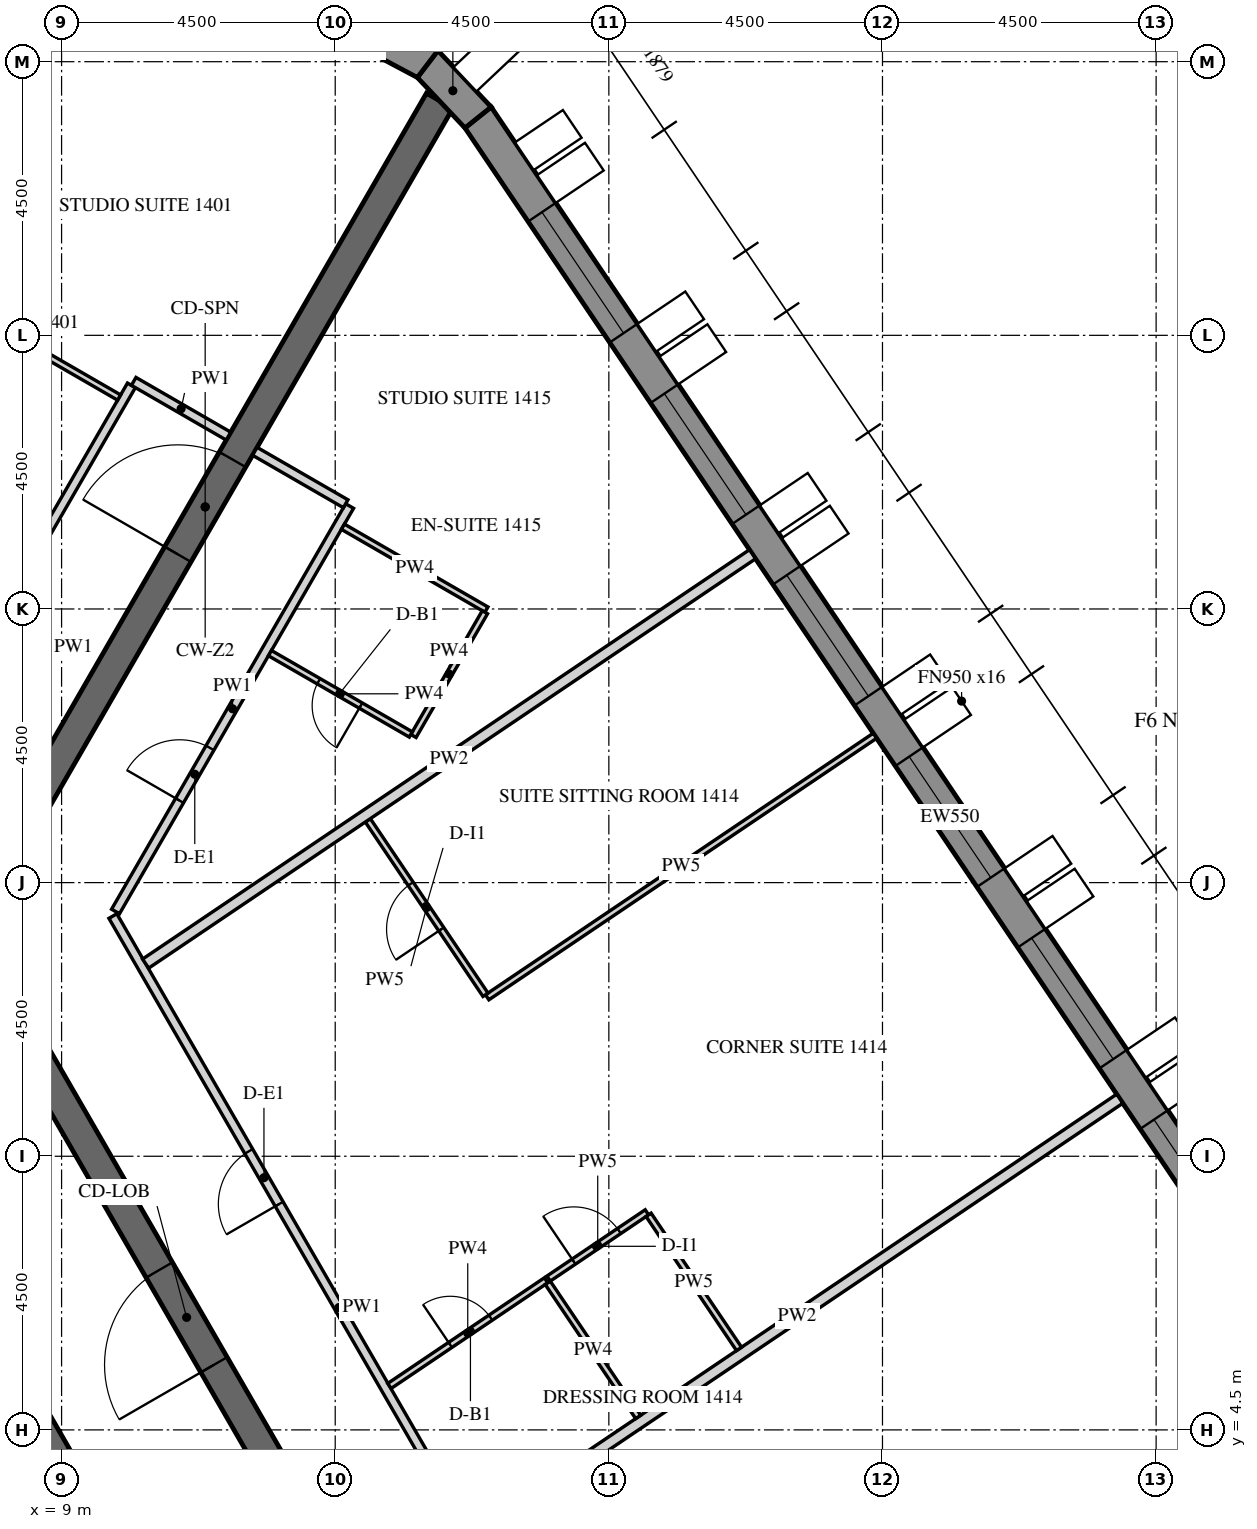
"""IFC4 building model, lengths in metres.
Left out: names, types, materials, properties, quantities, classifications, styles, units other than length and angle.
Written with IfcOpenShell. Run it as: python <this file> out.ifc"""

import sys

from ifc_helpers import new_model, si_unit, direction, frame, frame_2d, origin, place, context, subcontext, project, spatial, polyline, rectangle, outline, extrude, element, fill, save


model = new_model("IFC4")
c1 = context("Model", 3, precision=1e-05, world=origin(), true_north=direction((0.0, 1.0)))
c2 = subcontext(c1, "Body", "Model", "MODEL_VIEW")
j1 = project(units=[si_unit("LENGTHUNIT", "METRE"), si_unit("PLANEANGLEUNIT", "RADIAN")], contexts=[c1])
p1 = place(None, origin())
s1 = spatial("IfcSite", under=j1, at=p1, CompositionType="ELEMENT")
p2 = place(p1, origin())
s2 = spatial("IfcBuilding", under=s1, at=p2, CompositionType="ELEMENT")
p3 = place(p2, frame((0.0, 0.0, 183.9)))
s3 = spatial("IfcBuildingStorey", under=s2, at=p3, CompositionType="ELEMENT", Elevation=183.9)
p4 = place(p3, frame((31.371, 3.071, -0.15), z_axis=(0.0, 0.0, 1.0), x_axis=(-0.559189891278, 0.829039604297, 0.0)))
e1 = element("IfcWall", 1, at=p4, inside=s3, PredefinedType="SOLIDWALL", context=c2, shape_type="SweptSolid", body=[
    extrude(outline(polyline([(-0.026, -0.275), (27.781, -0.275), (27.736, 0.275), (0.026, 0.275), (-0.026, -0.275)])), origin(), (0.0, 0.0, 1.0), 3.9),
])
p5 = place(p4, frame((1.879, 0.0, 1.05)))
e2 = element("IfcOpeningElement", 2, at=p5, cuts=e1, PredefinedType="OPENING", context=c2, shape_type="SweptSolid", body=[
    extrude(rectangle(XDim=2.4, YDim=2.4, at=frame_2d((1.2, 1.2))), frame((0.0, 0.285, 0.0), z_axis=(0.0, -1.0, 0.0), x_axis=(1.0, 0.0, 0.0)), (0.0, 0.0, 1.0), 0.57),
])
p6 = place(p4, frame((5.479, 0.0, 1.05)))
e3 = element("IfcOpeningElement", 3, at=p6, cuts=e1, PredefinedType="OPENING", context=c2, shape_type="SweptSolid", body=[
    extrude(rectangle(XDim=2.4, YDim=2.4, at=frame_2d((1.2, 1.2))), frame((0.0, 0.285, 0.0), z_axis=(0.0, -1.0, 0.0), x_axis=(1.0, 0.0, 0.0)), (0.0, 0.0, 1.0), 0.57),
])
p7 = place(p4, frame((9.079, 0.0, 1.05)))
e4 = element("IfcOpeningElement", 4, at=p7, cuts=e1, PredefinedType="OPENING", context=c2, shape_type="SweptSolid", body=[
    extrude(rectangle(XDim=2.4, YDim=2.4, at=frame_2d((1.2, 1.2))), frame((0.0, 0.285, 0.0), z_axis=(0.0, -1.0, 0.0), x_axis=(1.0, 0.0, 0.0)), (0.0, 0.0, 1.0), 0.57),
])
p8 = place(p4, frame((12.679, 0.0, 1.05)))
e5 = element("IfcOpeningElement", 5, at=p8, cuts=e1, PredefinedType="OPENING", context=c2, shape_type="SweptSolid", body=[
    extrude(rectangle(XDim=2.4, YDim=2.4, at=frame_2d((1.2, 1.2))), frame((0.0, 0.285, 0.0), z_axis=(0.0, -1.0, 0.0), x_axis=(1.0, 0.0, 0.0)), (0.0, 0.0, 1.0), 0.57),
])
p9 = place(p4, frame((16.279, 0.0, 1.05)))
e6 = element("IfcOpeningElement", 6, at=p9, cuts=e1, PredefinedType="OPENING", context=c2, shape_type="SweptSolid", body=[
    extrude(rectangle(XDim=2.4, YDim=2.4, at=frame_2d((1.2, 1.2))), frame((0.0, 0.285, 0.0), z_axis=(0.0, -1.0, 0.0), x_axis=(1.0, 0.0, 0.0)), (0.0, 0.0, 1.0), 0.57),
])
p10 = place(p4, frame((19.879, 0.0, 1.05)))
e7 = element("IfcOpeningElement", 7, at=p10, cuts=e1, PredefinedType="OPENING", context=c2, shape_type="SweptSolid", body=[
    extrude(rectangle(XDim=2.4, YDim=2.4, at=frame_2d((1.2, 1.2))), frame((0.0, 0.285, 0.0), z_axis=(0.0, -1.0, 0.0), x_axis=(1.0, 0.0, 0.0)), (0.0, 0.0, 1.0), 0.57),
])
p11 = place(p4, frame((23.479, 0.0, 1.05)))
e8 = element("IfcOpeningElement", 8, at=p11, cuts=e1, PredefinedType="OPENING", context=c2, shape_type="SweptSolid", body=[
    extrude(rectangle(XDim=2.4, YDim=2.4, at=frame_2d((1.2, 1.2))), frame((0.0, 0.285, 0.0), z_axis=(0.0, -1.0, 0.0), x_axis=(1.0, 0.0, 0.0)), (0.0, 0.0, 1.0), 0.57),
])
p12 = place(p3, frame((15.849, 26.083, -0.15), z_axis=(0.0, 0.0, 1.0), x_axis=(-0.686196220404, 0.727416488061, 0.0)))
e9 = element("IfcWall", 9, at=p12, inside=s3, PredefinedType="SOLIDWALL", context=c2, shape_type="SweptSolid", body=[
    extrude(outline(polyline([(-0.022, -0.275), (1.253, -0.275), (1.163, 0.275), (0.022, 0.275), (-0.022, -0.275)])), origin(), (0.0, 0.0, 1.0), 3.9),
])
p13 = place(p3, frame((15.02, 26.962, -0.15), z_axis=(0.0, 0.0, 1.0), x_axis=(-0.882950818639, 0.469465495926, 0.0)))
e10 = element("IfcWall", 10, at=p13, inside=s3, PredefinedType="SOLIDWALL", context=c2, shape_type="SweptSolid", body=[
    extrude(outline(polyline([(-0.045, -0.275), (1.253, -0.275), (1.163, 0.275), (0.045, 0.275), (-0.045, -0.275)])), origin(), (0.0, 0.0, 1.0), 3.9),
])
p14 = place(p3, frame((14.722, 0.0, -0.15), z_axis=(0.0, 0.0, 1.0), x_axis=(-0.50000571537, 0.866022103989, 0.0)))
e11 = element("IfcWall", 11, at=p14, inside=s3, PredefinedType="SHEAR", context=c2, shape_type="SweptSolid", body=[
    extrude(outline(polyline([(-0.144, -0.25), (14.867, -0.25), (14.578, 0.25), (0.144, 0.25), (-0.144, -0.25)])), origin(), (0.0, 0.0, 1.0), 3.9),
])
p15 = place(p14, frame((6.432, 0.0, 0.15)))
e12 = element("IfcOpeningElement", 12, at=p15, cuts=e11, PredefinedType="OPENING", context=c2, shape_type="SweptSolid", body=[
    extrude(rectangle(XDim=1.8, YDim=2.4, at=frame_2d((0.9, 1.2))), frame((0.0, 0.26, 0.0), z_axis=(0.0, -1.0, 0.0), x_axis=(1.0, 0.0, 0.0)), (0.0, 0.0, 1.0), 0.52),
])
p16 = place(p3, frame((7.506, 13.0, -0.15), z_axis=(0.0, 0.0, 1.0), x_axis=(0.499988271576, 0.866032175087, 0.0)))
e13 = element("IfcWall", 13, at=p16, inside=s3, PredefinedType="SHEAR", context=c2, shape_type="SweptSolid", body=[
    extrude(rectangle(XDim=15.424, YDim=0.5, at=frame_2d((7.712, 0.0))), origin(), (0.0, 0.0, 1.0), 3.9),
])
p17 = place(p16, frame((6.812, 0.0, 0.15)))
e14 = element("IfcOpeningElement", 14, at=p17, cuts=e13, PredefinedType="OPENING", context=c2, shape_type="SweptSolid", body=[
    extrude(rectangle(XDim=1.8, YDim=2.4, at=frame_2d((0.9, 1.2))), frame((0.0, 0.26, 0.0), z_axis=(0.0, -1.0, 0.0), x_axis=(1.0, 0.0, 0.0)), (0.0, 0.0, 1.0), 0.52),
])
p18 = place(p3, frame((11.345, 0.0, -0.15), z_axis=(0.0, 0.0, 1.0), x_axis=(-0.499995046907, 0.866028263435, 0.0)))
e15 = element("IfcWall", 15, at=p18, inside=s3, PredefinedType="SHEAR", context=c2, shape_type="SweptSolid", body=[
    extrude(outline(polyline([(-0.101, -0.175), (11.446, -0.175), (11.244, 0.175), (0.101, 0.175), (-0.101, -0.175)])), origin(), (0.0, 0.0, 1.0), 3.9),
])
p19 = place(p18, frame((4.744, 0.0, 0.15)))
e16 = element("IfcOpeningElement", 16, at=p19, cuts=e15, PredefinedType="OPENING", context=c2, shape_type="SweptSolid", body=[
    extrude(rectangle(XDim=1.8, YDim=2.4, at=frame_2d((0.9, 1.2))), frame((0.0, 0.185, 0.0), z_axis=(0.0, -1.0, 0.0), x_axis=(1.0, 0.0, 0.0)), (0.0, 0.0, 1.0), 0.37),
])
p20 = place(p3, frame((10.149, 21.678, 0.0), z_axis=(0.0, 0.0, 1.0), x_axis=(-0.499993780622, -0.866028994514, 0.0)))
e17 = element("IfcWall", 17, at=p20, inside=s3, PredefinedType="PARTITIONING", context=c2, shape_type="SweptSolid", body=[
    extrude(rectangle(XDim=7.711, YDim=0.15, at=frame_2d((3.855, 0.0))), origin(), (0.0, 0.0, 1.0), 2.988),
])
p21 = place(p20, frame((4.718, 0.0, 0.0)))
e18 = element("IfcOpeningElement", 18, at=p21, cuts=e17, PredefinedType="OPENING", context=c2, shape_type="SweptSolid", body=[
    extrude(rectangle(XDim=1.0, YDim=2.1, at=frame_2d((0.5, 1.05))), frame((0.0, 0.085, 0.0), z_axis=(0.0, -1.0, 0.0), x_axis=(1.0, 0.0, 0.0)), (0.0, 0.0, 1.0), 0.17),
])
p22 = place(p3, frame((11.745, 20.843, 0.0), z_axis=(0.0, 0.0, 1.0), x_axis=(-0.865989075817, 0.500062916607, 0.0)))
e19 = element("IfcWall", 19, at=p22, inside=s3, PredefinedType="PARTITIONING", context=c2, shape_type="SweptSolid", body=[
    extrude(rectangle(XDim=1.8, YDim=0.15, at=frame_2d((0.9, 0.0))), origin(), (0.0, 0.0, 1.0), 2.988),
])
p23 = place(p3, frame((17.277, 0.075, 0.0), z_axis=(0.0, 0.0, 1.0), x_axis=(-0.499998228944, 0.866026426302, 0.0)))
e20 = element("IfcWall", 20, at=p23, inside=s3, PredefinedType="PARTITIONING", context=c2, shape_type="SweptSolid", body=[
    extrude(rectangle(XDim=14.867, YDim=0.15, at=frame_2d((7.433, 0.0))), origin(), (0.0, 0.0, 1.0), 2.988),
])
p24 = place(p23, frame((9.398, 0.0, 0.0)))
e21 = element("IfcOpeningElement", 21, at=p24, cuts=e20, PredefinedType="OPENING", context=c2, shape_type="SweptSolid", body=[
    extrude(rectangle(XDim=1.0, YDim=2.1, at=frame_2d((0.5, 1.05))), frame((0.0, 0.085, 0.0), z_axis=(0.0, -1.0, 0.0), x_axis=(1.0, 0.0, 0.0)), (0.0, 0.0, 1.0), 0.17),
])
p25 = place(p3, frame((9.887, 13.025, 0.0), z_axis=(0.0, 0.0, 1.0), x_axis=(0.499985955615, 0.866033512162, 0.0)))
e22 = element("IfcWall", 22, at=p25, inside=s3, PredefinedType="PARTITIONING", context=c2, shape_type="SweptSolid", body=[
    extrude(rectangle(XDim=7.699, YDim=0.15, at=frame_2d((3.85, 0.0))), origin(), (0.0, 0.0, 1.0), 2.988),
])
p26 = place(p25, frame((2.106, 0.0, 0.0)))
e23 = element("IfcOpeningElement", 23, at=p26, cuts=e22, PredefinedType="OPENING", context=c2, shape_type="SweptSolid", body=[
    extrude(rectangle(XDim=1.0, YDim=2.1, at=frame_2d((0.5, 1.05))), frame((0.0, 0.085, 0.0), z_axis=(0.0, -1.0, 0.0), x_axis=(1.0, 0.0, 0.0)), (0.0, 0.0, 1.0), 0.17),
])
p27 = place(p3, frame((13.672, 19.73, 0.0), z_axis=(0.0, 0.0, 1.0), x_axis=(-0.866074815912, 0.499914405916, 0.0)))
e24 = element("IfcWall", 24, at=p27, inside=s3, PredefinedType="PARTITIONING", context=c2, shape_type="SweptSolid", body=[
    extrude(rectangle(XDim=1.725, YDim=0.15, at=frame_2d((0.862, 0.0))), origin(), (0.0, 0.0, 1.0), 2.988),
])
p28 = place(p3, frame((7.803, 22.715, 0.0), z_axis=(0.0, 0.0, 1.0), x_axis=(0.866006523861, -0.500032699561, 0.0)))
e25 = element("IfcWall", 25, at=p28, inside=s3, PredefinedType="PARTITIONING", context=c2, shape_type="SweptSolid", body=[
    extrude(rectangle(XDim=2.475, YDim=0.1, at=frame_2d((1.237, 0.0))), origin(), (0.0, 0.0, 1.0), 2.988),
])
p29 = place(p3, frame((26.402, 9.946, 0.0), z_axis=(0.0, 0.0, 1.0), x_axis=(-0.829037771727, -0.559192608187, 0.0)))
e26 = element("IfcWall", 26, at=p29, inside=s3, PredefinedType="PARTITIONING", context=c2, shape_type="SweptSolid", body=[
    extrude(rectangle(XDim=12.794, YDim=0.18, at=frame_2d((6.397, 0.0))), origin(), (0.0, 0.0, 1.0), 2.988),
])
p30 = place(p3, frame((14.392, 5.223, 0.0), z_axis=(0.0, 0.0, 1.0), x_axis=(0.829015360708, 0.559225832477, 0.0)))
e27 = element("IfcWall", 27, at=p30, inside=s3, PredefinedType="PARTITIONING", context=c2, shape_type="SweptSolid", body=[
    extrude(rectangle(XDim=3.107, YDim=0.1, at=frame_2d((1.553, 0.0))), origin(), (0.0, 0.0, 1.0), 2.988),
])
p31 = place(p30, frame((1.207, 0.0, 0.0)))
e28 = element("IfcOpeningElement", 28, at=p31, cuts=e27, PredefinedType="OPENING", context=c2, shape_type="SweptSolid", body=[
    extrude(rectangle(XDim=0.8, YDim=2.1, at=frame_2d((0.4, 1.05))), frame((0.0, 0.06, 0.0), z_axis=(0.0, -1.0, 0.0), x_axis=(1.0, 0.0, 0.0)), (0.0, 0.0, 1.0), 0.12),
])
p32 = place(p3, frame((17.009, 6.988, 0.0), z_axis=(0.0, 0.0, 1.0), x_axis=(0.828974932022, 0.559285760662, 0.0)))
e29 = element("IfcWall", 29, at=p32, inside=s3, PredefinedType="PARTITIONING", context=c2, shape_type="SweptSolid", body=[
    extrude(rectangle(XDim=1.95, YDim=0.1, at=frame_2d((0.975, 0.0))), origin(), (0.0, 0.0, 1.0), 2.988),
])
p33 = place(p32, frame((0.5, 0.0, 0.0)))
e30 = element("IfcOpeningElement", 30, at=p33, cuts=e29, PredefinedType="OPENING", context=c2, shape_type="SweptSolid", body=[
    extrude(rectangle(XDim=0.9, YDim=2.1, at=frame_2d((0.45, 1.05))), frame((0.0, 0.06, 0.0), z_axis=(0.0, -1.0, 0.0), x_axis=(1.0, 0.0, 0.0)), (0.0, 0.0, 1.0), 0.12),
])
p34 = place(p3, frame((18.653, 8.037, 0.0), z_axis=(0.0, 0.0, 1.0), x_axis=(0.559203284223, -0.829030570555, 0.0)))
e31 = element("IfcWall", 31, at=p34, inside=s3, PredefinedType="PARTITIONING", context=c2, shape_type="SweptSolid", body=[
    extrude(rectangle(XDim=2.66, YDim=0.1, at=frame_2d((1.33, 0.0))), origin(), (0.0, 0.0, 1.0), 2.988),
])
p35 = place(p3, frame((22.376, 15.915, 0.0), z_axis=(0.0, 0.0, 1.0), x_axis=(-0.829044752643, -0.559182258406, 0.0)))
e32 = element("IfcWall", 32, at=p35, inside=s3, PredefinedType="PARTITIONING", context=c2, shape_type="SweptSolid", body=[
    extrude(rectangle(XDim=7.692, YDim=0.1, at=frame_2d((3.846, 0.0))), origin(), (0.0, 0.0, 1.0), 2.988),
])
p36 = place(p3, frame((15.971, 11.656, 0.0), z_axis=(0.0, 0.0, 1.0), x_axis=(-0.559202575539, 0.829031048581, 0.0)))
e33 = element("IfcWall", 33, at=p36, inside=s3, PredefinedType="PARTITIONING", context=c2, shape_type="SweptSolid", body=[
    extrude(rectangle(XDim=3.46, YDim=0.1, at=frame_2d((1.73, 0.0))), origin(), (0.0, 0.0, 1.0), 2.988),
])
p37 = place(p36, frame((1.3, 0.0, 0.0)))
e34 = element("IfcOpeningElement", 34, at=p37, cuts=e33, PredefinedType="OPENING", context=c2, shape_type="SweptSolid", body=[
    extrude(rectangle(XDim=0.9, YDim=2.1, at=frame_2d((0.45, 1.05))), frame((0.0, 0.06, 0.0), z_axis=(0.0, -1.0, 0.0), x_axis=(1.0, 0.0, 0.0)), (0.0, 0.0, 1.0), 0.12),
])
p38 = place(p3, frame((20.363, 18.9, 0.0), z_axis=(0.0, 0.0, 1.0), x_axis=(-0.829027307641, -0.559208121531, 0.0)))
e35 = element("IfcWall", 35, at=p38, inside=s3, PredefinedType="PARTITIONING", context=c2, shape_type="SweptSolid", body=[
    extrude(rectangle(XDim=12.039, YDim=0.18, at=frame_2d((6.02, 0.0))), origin(), (0.0, 0.0, 1.0), 2.988),
])
p39 = place(p3, frame((18.483, 4.713, 0.0), z_axis=(0.0, 0.0, 1.0), x_axis=(-0.559140201119, 0.829073118303, 0.0)))
e36 = element("IfcWall", 36, at=p39, inside=s3, PredefinedType="PARTITIONING", context=c2, shape_type="SweptSolid", body=[
    extrude(rectangle(XDim=2.66, YDim=0.1, at=frame_2d((1.33, 0.0))), origin(), (0.0, 0.0, 1.0), 2.988),
])
p40 = place(p3, frame((13.627, 19.352, 0.0), z_axis=(0.0, 0.0, 1.0), x_axis=(0.866012511928, -0.500022328685, 0.0)))
e37 = element("IfcWall", 37, at=p40, inside=s3, PredefinedType="PARTITIONING", context=c2, shape_type="SweptSolid", body=[
    extrude(rectangle(XDim=2.725, YDim=0.1, at=frame_2d((1.363, 0.0))), origin(), (0.0, 0.0, 1.0), 2.988),
])
p41 = place(p3, frame((15.962, 17.947, 0.0), z_axis=(0.0, 0.0, 1.0), x_axis=(-0.500016218704, -0.866016039709, 0.0)))
e38 = element("IfcWall", 38, at=p41, inside=s3, PredefinedType="PARTITIONING", context=c2, shape_type="SweptSolid", body=[
    extrude(rectangle(XDim=2.35, YDim=0.1, at=frame_2d((1.175, 0.0))), origin(), (0.0, 0.0, 1.0), 2.988),
])
p42 = place(p3, frame((14.743, 15.936, 0.0), z_axis=(0.0, 0.0, 1.0), x_axis=(-0.86604424267, 0.499967368674, 0.0)))
e39 = element("IfcWall", 39, at=p42, inside=s3, PredefinedType="PARTITIONING", context=c2, shape_type="SweptSolid", body=[
    extrude(rectangle(XDim=2.675, YDim=0.1, at=frame_2d((1.337, 0.0))), origin(), (0.0, 0.0, 1.0), 2.988),
])
p43 = place(p42, frame((0.95, 0.0, 0.0)))
e40 = element("IfcOpeningElement", 40, at=p43, cuts=e39, PredefinedType="OPENING", context=c2, shape_type="SweptSolid", body=[
    extrude(rectangle(XDim=0.8, YDim=2.1, at=frame_2d((0.4, 1.05))), frame((0.0, 0.06, 0.0), z_axis=(0.0, -1.0, 0.0), x_axis=(1.0, 0.0, 0.0)), (0.0, 0.0, 1.0), 0.12),
])
p44 = place(p6, frame((0.0, 0.205, 0.0)))
e41 = element("IfcWindow", 41, at=p44, inside=s3, PartitioningType="DOUBLE_PANEL_VERTICAL", PredefinedType="WINDOW", context=c2, shape_type="SweptSolid", body=[
    extrude(rectangle(XDim=2.4, YDim=2.4, at=frame_2d((1.2, 1.2))), frame((0.0, 0.03, 0.0), z_axis=(0.0, -1.0, 0.0), x_axis=(1.0, 0.0, 0.0)), (0.0, 0.0, 1.0), 0.06),
])
fill(e3, e41)
p45 = place(p7, frame((0.0, 0.205, 0.0)))
e42 = element("IfcWindow", 42, at=p45, inside=s3, PartitioningType="DOUBLE_PANEL_VERTICAL", PredefinedType="WINDOW", context=c2, shape_type="SweptSolid", body=[
    extrude(rectangle(XDim=2.4, YDim=2.4, at=frame_2d((1.2, 1.2))), frame((0.0, 0.03, 0.0), z_axis=(0.0, -1.0, 0.0), x_axis=(1.0, 0.0, 0.0)), (0.0, 0.0, 1.0), 0.06),
])
fill(e4, e42)
p46 = place(p8, frame((0.0, 0.205, 0.0)))
e43 = element("IfcWindow", 43, at=p46, inside=s3, PartitioningType="DOUBLE_PANEL_VERTICAL", PredefinedType="WINDOW", context=c2, shape_type="SweptSolid", body=[
    extrude(rectangle(XDim=2.4, YDim=2.4, at=frame_2d((1.2, 1.2))), frame((0.0, 0.03, 0.0), z_axis=(0.0, -1.0, 0.0), x_axis=(1.0, 0.0, 0.0)), (0.0, 0.0, 1.0), 0.06),
])
fill(e5, e43)
p47 = place(p9, frame((0.0, 0.205, 0.0)))
e44 = element("IfcWindow", 44, at=p47, inside=s3, PartitioningType="DOUBLE_PANEL_VERTICAL", PredefinedType="WINDOW", context=c2, shape_type="SweptSolid", body=[
    extrude(rectangle(XDim=2.4, YDim=2.4, at=frame_2d((1.2, 1.2))), frame((0.0, 0.03, 0.0), z_axis=(0.0, -1.0, 0.0), x_axis=(1.0, 0.0, 0.0)), (0.0, 0.0, 1.0), 0.06),
])
fill(e6, e44)
p48 = place(p10, frame((0.0, 0.205, 0.0)))
e45 = element("IfcWindow", 45, at=p48, inside=s3, PartitioningType="DOUBLE_PANEL_VERTICAL", PredefinedType="WINDOW", context=c2, shape_type="SweptSolid", body=[
    extrude(rectangle(XDim=2.4, YDim=2.4, at=frame_2d((1.2, 1.2))), frame((0.0, 0.03, 0.0), z_axis=(0.0, -1.0, 0.0), x_axis=(1.0, 0.0, 0.0)), (0.0, 0.0, 1.0), 0.06),
])
fill(e7, e45)
p49 = place(p11, frame((0.0, 0.205, 0.0)))
e46 = element("IfcWindow", 46, at=p49, inside=s3, PartitioningType="DOUBLE_PANEL_VERTICAL", PredefinedType="WINDOW", context=c2, shape_type="SweptSolid", body=[
    extrude(rectangle(XDim=2.4, YDim=2.4, at=frame_2d((1.2, 1.2))), frame((0.0, 0.03, 0.0), z_axis=(0.0, -1.0, 0.0), x_axis=(1.0, 0.0, 0.0)), (0.0, 0.0, 1.0), 0.06),
])
fill(e8, e46)
p50 = place(p15, origin())
e47 = element("IfcDoor", 47, at=p50, inside=s3, OperationType="DOUBLE_DOOR_SINGLE_SWING", PredefinedType="DOOR", context=c2, shape_type="SweptSolid", body=[
    extrude(rectangle(XDim=1.8, YDim=2.4, at=frame_2d((0.9, 1.2))), frame((0.0, 0.025, 0.0), z_axis=(0.0, -1.0, 0.0), x_axis=(1.0, 0.0, 0.0)), (0.0, 0.0, 1.0), 0.05),
])
fill(e12, e47)
p51 = place(p17, origin())
e48 = element("IfcDoor", 48, at=p51, inside=s3, OperationType="DOUBLE_DOOR_SINGLE_SWING", PredefinedType="DOOR", context=c2, shape_type="SweptSolid", body=[
    extrude(rectangle(XDim=1.8, YDim=2.4, at=frame_2d((0.9, 1.2))), frame((0.0, 0.025, 0.0), z_axis=(0.0, -1.0, 0.0), x_axis=(1.0, 0.0, 0.0)), (0.0, 0.0, 1.0), 0.05),
])
fill(e14, e48)
p52 = place(p19, origin())
e49 = element("IfcDoor", 49, at=p52, inside=s3, OperationType="DOUBLE_DOOR_SINGLE_SWING", PredefinedType="DOOR", context=c2, shape_type="SweptSolid", body=[
    extrude(rectangle(XDim=1.8, YDim=2.4, at=frame_2d((0.9, 1.2))), frame((0.0, 0.025, 0.0), z_axis=(0.0, -1.0, 0.0), x_axis=(1.0, 0.0, 0.0)), (0.0, 0.0, 1.0), 0.05),
])
fill(e16, e49)
p53 = place(p24, origin())
e50 = element("IfcDoor", 50, at=p53, inside=s3, OperationType="SINGLE_SWING_RIGHT", PredefinedType="DOOR", context=c2, shape_type="SweptSolid", body=[
    extrude(rectangle(XDim=1.0, YDim=2.1, at=frame_2d((0.5, 1.05))), frame((0.0, 0.025, 0.0), z_axis=(0.0, -1.0, 0.0), x_axis=(1.0, 0.0, 0.0)), (0.0, 0.0, 1.0), 0.05),
])
fill(e21, e50)
p54 = place(p31, origin())
e51 = element("IfcDoor", 51, at=p54, inside=s3, OperationType="SINGLE_SWING_LEFT", PredefinedType="DOOR", context=c2, shape_type="SweptSolid", body=[
    extrude(rectangle(XDim=0.8, YDim=2.1, at=frame_2d((0.4, 1.05))), frame((0.0, 0.025, 0.0), z_axis=(0.0, -1.0, 0.0), x_axis=(1.0, 0.0, 0.0)), (0.0, 0.0, 1.0), 0.05),
])
fill(e28, e51)
p55 = place(p33, origin())
e52 = element("IfcDoor", 52, at=p55, inside=s3, OperationType="SINGLE_SWING_RIGHT", PredefinedType="DOOR", context=c2, shape_type="SweptSolid", body=[
    extrude(rectangle(XDim=0.9, YDim=2.1, at=frame_2d((0.45, 1.05))), frame((0.0, 0.025, 0.0), z_axis=(0.0, -1.0, 0.0), x_axis=(1.0, 0.0, 0.0)), (0.0, 0.0, 1.0), 0.05),
])
fill(e30, e52)
p56 = place(p37, origin())
e53 = element("IfcDoor", 53, at=p56, inside=s3, OperationType="SINGLE_SWING_LEFT", PredefinedType="DOOR", context=c2, shape_type="SweptSolid", body=[
    extrude(rectangle(XDim=0.9, YDim=2.1, at=frame_2d((0.45, 1.05))), frame((0.0, 0.025, 0.0), z_axis=(0.0, -1.0, 0.0), x_axis=(1.0, 0.0, 0.0)), (0.0, 0.0, 1.0), 0.05),
])
fill(e34, e53)
p57 = place(p26, origin())
e54 = element("IfcDoor", 54, at=p57, inside=s3, OperationType="SINGLE_SWING_RIGHT", PredefinedType="DOOR", context=c2, shape_type="SweptSolid", body=[
    extrude(rectangle(XDim=1.0, YDim=2.1, at=frame_2d((0.5, 1.05))), frame((0.0, 0.025, 0.0), z_axis=(0.0, -1.0, 0.0), x_axis=(1.0, 0.0, 0.0)), (0.0, 0.0, 1.0), 0.05),
])
fill(e23, e54)
p58 = place(p43, origin())
e55 = element("IfcDoor", 55, at=p58, inside=s3, OperationType="SINGLE_SWING_RIGHT", PredefinedType="DOOR", context=c2, shape_type="SweptSolid", body=[
    extrude(rectangle(XDim=0.8, YDim=2.1, at=frame_2d((0.4, 1.05))), frame((0.0, 0.025, 0.0), z_axis=(0.0, -1.0, 0.0), x_axis=(1.0, 0.0, 0.0)), (0.0, 0.0, 1.0), 0.05),
])
fill(e40, e55)
save(model, sys.argv[1])
